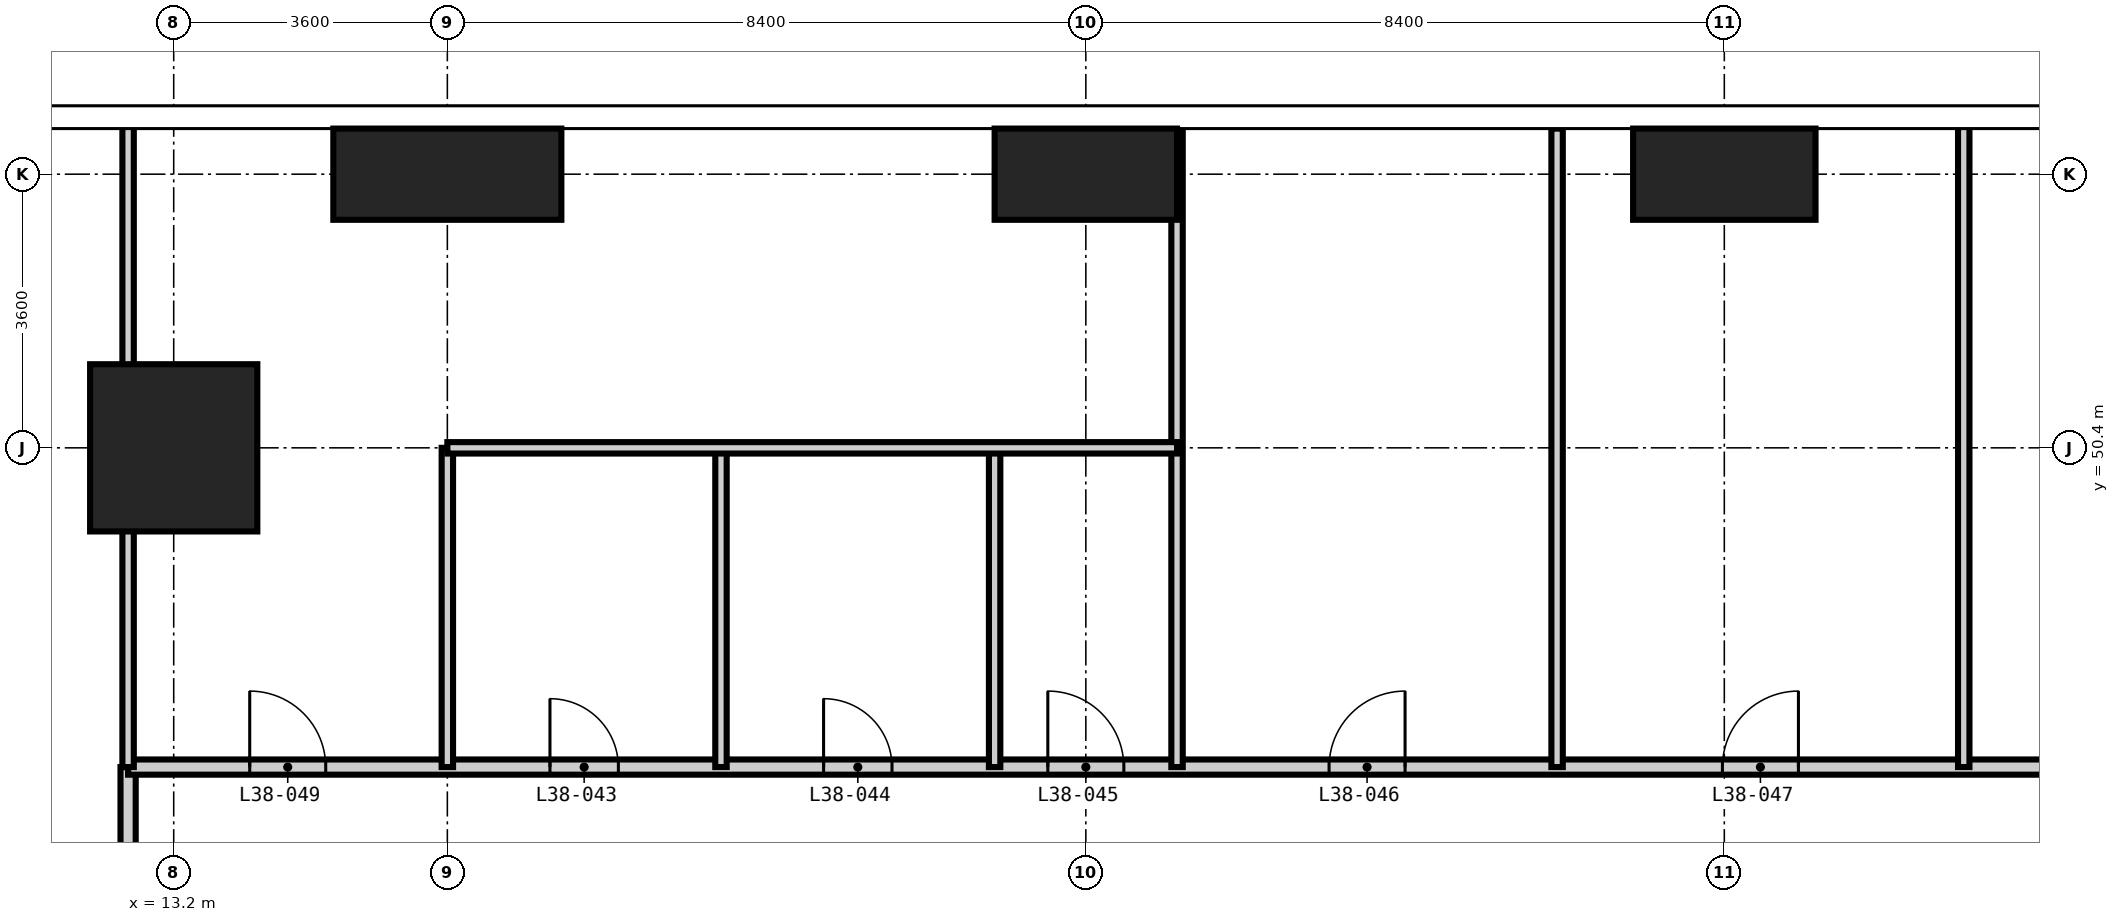
"""IFC4 building model, lengths in metres.
Left out: names, types, materials, properties, quantities, classifications, styles, units other than length and angle.
Written with IfcOpenShell. Run it as: python <this file> out.ifc"""

import sys

from ifc_helpers import new_model, si_unit, direction, frame, frame_2d, origin, origin_2d, place, context, subcontext, project, spatial, rectangle, extrude, element, fill, save


model = new_model("IFC4")
c1 = context("Model", 3, precision=1e-05, world=origin(), true_north=direction((0.0, 1.0)))
c2 = subcontext(c1, "Body", "Model", "MODEL_VIEW")
j1 = project(units=[si_unit("LENGTHUNIT", "METRE"), si_unit("PLANEANGLEUNIT", "RADIAN")], contexts=[c1])
p1 = place(None, origin())
s1 = spatial("IfcSite", under=j1, at=p1, CompositionType="ELEMENT")
p2 = place(p1, origin())
s2 = spatial("IfcBuilding", under=s1, at=p2, CompositionType="ELEMENT")
p3 = place(p2, frame((0.0, 0.0, 147.6)))
s3 = spatial("IfcBuildingStorey", under=s2, at=p3, CompositionType="ELEMENT", Elevation=147.6)
p4 = place(p3, frame((13.2, 50.4, -0.35), z_axis=(0.0, 0.0, 1.0), x_axis=(1.0, 0.0, 0.0)))
e1 = element("IfcColumn", 1, at=p4, inside=s3, PredefinedType="COLUMN", context=c2, shape_type="SweptSolid", body=[
    extrude(rectangle(XDim=2.2, YDim=2.2, at=origin_2d()), origin(), (0.0, 0.0, 1.0), 5.95),
])
p5 = place(p3, frame((16.8, 54.0, -0.35), z_axis=(0.0, 0.0, 1.0), x_axis=(1.0, 0.0, 0.0)))
e2 = element("IfcColumn", 2, at=p5, inside=s3, PredefinedType="COLUMN", context=c2, shape_type="SweptSolid", body=[
    extrude(rectangle(XDim=3.0, YDim=1.2, at=origin_2d()), origin(), (0.0, 0.0, 1.0), 5.95),
])
for number, where, z_axis, x_axis in (
    (3, (25.2, 54.0, -0.35), (0.0, 0.0, 1.0), (1.0, 0.0, 0.0)),
    (4, (33.6, 54.0, -0.35), (0.0, 0.0, 1.0), (1.0, 0.0, 0.0)),
):
    element("IfcColumn", number, at=place(p3, frame(where, z_axis=z_axis, x_axis=x_axis)), inside=s3, PredefinedType="COLUMN", context=c2, shape_type="SweptSolid", body=[
        extrude(rectangle(XDim=2.4, YDim=1.2, at=origin_2d()), origin(), (0.0, 0.0, 1.0), 5.95),
    ])
p6 = place(p3, frame((12.6, 33.6, 0.0), z_axis=(0.0, 0.0, 1.0), x_axis=(0.0, 1.0, 0.0)))
e5 = element("IfcWall", 5, at=p6, inside=s3, PredefinedType="PARTITIONING", context=c2, shape_type="SweptSolid", body=[
    extrude(rectangle(XDim=12.6, YDim=0.2, at=frame_2d((6.3, 0.0))), origin(), (0.0, 0.0, 1.0), 5.6),
])
p7 = place(p3, frame((12.6, 46.2, 0.0), z_axis=(0.0, 0.0, 1.0), x_axis=(1.0, 0.0, 0.0)))
e6 = element("IfcWall", 6, at=p7, inside=s3, PredefinedType="PARTITIONING", context=c2, shape_type="SweptSolid", body=[
    extrude(rectangle(XDim=29.4, YDim=0.2, at=frame_2d((14.7, 0.0))), origin(), (0.0, 0.0, 1.0), 5.6),
])
p8 = place(p7, frame((5.55, 0.0, 0.0)))
e7 = element("IfcOpeningElement", 7, at=p8, cuts=e6, PredefinedType="OPENING", context=c2, shape_type="SweptSolid", body=[
    extrude(rectangle(XDim=0.9, YDim=2.1, at=frame_2d((0.45, 1.05))), frame((0.0, 0.11, 0.0), z_axis=(0.0, -1.0, 0.0), x_axis=(1.0, 0.0, 0.0)), (0.0, 0.0, 1.0), 0.22),
])
p9 = place(p7, frame((9.15, 0.0, 0.0)))
e8 = element("IfcOpeningElement", 8, at=p9, cuts=e6, PredefinedType="OPENING", context=c2, shape_type="SweptSolid", body=[
    extrude(rectangle(XDim=0.9, YDim=2.1, at=frame_2d((0.45, 1.05))), frame((0.0, 0.11, 0.0), z_axis=(0.0, -1.0, 0.0), x_axis=(1.0, 0.0, 0.0)), (0.0, 0.0, 1.0), 0.22),
])
p10 = place(p7, frame((12.1, 0.0, 0.0)))
e9 = element("IfcOpeningElement", 9, at=p10, cuts=e6, PredefinedType="OPENING", context=c2, shape_type="SweptSolid", body=[
    extrude(rectangle(XDim=1.0, YDim=2.1, at=frame_2d((0.5, 1.05))), frame((0.0, 0.11, 0.0), z_axis=(0.0, -1.0, 0.0), x_axis=(1.0, 0.0, 0.0)), (0.0, 0.0, 1.0), 0.22),
])
p11 = place(p7, frame((15.8, 0.0, 0.0)))
e10 = element("IfcOpeningElement", 10, at=p11, cuts=e6, PredefinedType="OPENING", context=c2, shape_type="SweptSolid", body=[
    extrude(rectangle(XDim=1.0, YDim=2.1, at=frame_2d((0.5, 1.05))), frame((0.0, 0.11, 0.0), z_axis=(0.0, -1.0, 0.0), x_axis=(1.0, 0.0, 0.0)), (0.0, 0.0, 1.0), 0.22),
])
p12 = place(p7, frame((20.975, 0.0, 0.0)))
e11 = element("IfcOpeningElement", 11, at=p12, cuts=e6, PredefinedType="OPENING", context=c2, shape_type="SweptSolid", body=[
    extrude(rectangle(XDim=1.0, YDim=2.1, at=frame_2d((0.5, 1.05))), frame((0.0, 0.11, 0.0), z_axis=(0.0, -1.0, 0.0), x_axis=(1.0, 0.0, 0.0)), (0.0, 0.0, 1.0), 0.22),
])
p13 = place(p7, frame((26.275, 0.0, 0.0)))
e12 = element("IfcOpeningElement", 12, at=p13, cuts=e6, PredefinedType="OPENING", context=c2, shape_type="SweptSolid", body=[
    extrude(rectangle(XDim=1.0, YDim=2.1, at=frame_2d((0.5, 1.05))), frame((0.0, 0.11, 0.0), z_axis=(0.0, -1.0, 0.0), x_axis=(1.0, 0.0, 0.0)), (0.0, 0.0, 1.0), 0.22),
])
p14 = place(p7, frame((1.6, 0.0, 0.0)))
e13 = element("IfcOpeningElement", 13, at=p14, cuts=e6, PredefinedType="OPENING", context=c2, shape_type="SweptSolid", body=[
    extrude(rectangle(XDim=1.0, YDim=2.1, at=frame_2d((0.5, 1.05))), frame((0.0, 0.11, 0.0), z_axis=(0.0, -1.0, 0.0), x_axis=(1.0, 0.0, 0.0)), (0.0, 0.0, 1.0), 0.22),
])
p15 = place(p3, frame((12.6, 46.2, 0.0), z_axis=(0.0, 0.0, 1.0), x_axis=(0.0, 1.0, 0.0)))
e14 = element("IfcWall", 14, at=p15, inside=s3, PredefinedType="PARTITIONING", context=c2, shape_type="SweptSolid", body=[
    extrude(rectangle(XDim=8.438, YDim=0.15, at=frame_2d((4.219, 0.0))), origin(), (0.0, 0.0, 1.0), 5.6),
])
for number, where, z_axis, x_axis in (
    (15, (16.8, 46.2, 0.0), (0.0, 0.0, 1.0), (0.0, 1.0, 0.0)),
    (16, (20.4, 46.2, 0.0), (0.0, 0.0, 1.0), (0.0, 1.0, 0.0)),
    (17, (24.0, 46.2, 0.0), (0.0, 0.0, 1.0), (0.0, 1.0, 0.0)),
):
    element("IfcWall", number, at=place(p3, frame(where, z_axis=z_axis, x_axis=x_axis)), inside=s3, PredefinedType="PARTITIONING", context=c2, shape_type="SweptSolid", body=[
        extrude(rectangle(XDim=4.2, YDim=0.15, at=frame_2d((2.1, 0.0))), origin(), (0.0, 0.0, 1.0), 5.6),
    ])
p16 = place(p3, frame((26.4, 46.2, 0.0), z_axis=(0.0, 0.0, 1.0), x_axis=(0.0, 1.0, 0.0)))
e18 = element("IfcWall", 18, at=p16, inside=s3, PredefinedType="PARTITIONING", context=c2, shape_type="SweptSolid", body=[
    extrude(rectangle(XDim=8.438, YDim=0.15, at=frame_2d((4.219, 0.0))), origin(), (0.0, 0.0, 1.0), 5.6),
])
p17 = place(p3, frame((31.4, 46.2, 0.0), z_axis=(0.0, 0.0, 1.0), x_axis=(0.0, 1.0, 0.0)))
e19 = element("IfcWall", 19, at=p17, inside=s3, PredefinedType="PARTITIONING", context=c2, shape_type="SweptSolid", body=[
    extrude(rectangle(XDim=8.4, YDim=0.15, at=frame_2d((4.2, 0.0))), origin(), (0.0, 0.0, 1.0), 5.6),
])
p18 = place(p3, frame((36.75, 46.2, 0.0), z_axis=(0.0, 0.0, 1.0), x_axis=(0.0, 1.0, 0.0)))
e20 = element("IfcWall", 20, at=p18, inside=s3, PredefinedType="PARTITIONING", context=c2, shape_type="SweptSolid", body=[
    extrude(rectangle(XDim=8.438, YDim=0.15, at=frame_2d((4.219, 0.0))), origin(), (0.0, 0.0, 1.0), 5.6),
])
p19 = place(p3, frame((16.8, 50.4, 0.0), z_axis=(0.0, 0.0, 1.0), x_axis=(1.0, 0.0, 0.0)))
e21 = element("IfcWall", 21, at=p19, inside=s3, PredefinedType="PARTITIONING", context=c2, shape_type="SweptSolid", body=[
    extrude(rectangle(XDim=9.6, YDim=0.15, at=frame_2d((4.8, 0.0))), origin(), (0.0, 0.0, 1.0), 5.6),
])
p20 = place(p8, origin())
e22 = element("IfcDoor", 22, at=p20, inside=s3, OperationType="SINGLE_SWING_LEFT", PredefinedType="DOOR", context=c2, shape_type="SweptSolid", body=[
    extrude(rectangle(XDim=0.9, YDim=2.1, at=frame_2d((0.45, 1.05))), frame((0.0, 0.025, 0.0), z_axis=(0.0, -1.0, 0.0), x_axis=(1.0, 0.0, 0.0)), (0.0, 0.0, 1.0), 0.05),
])
fill(e7, e22)
p21 = place(p9, origin())
e23 = element("IfcDoor", 23, at=p21, inside=s3, OperationType="SINGLE_SWING_LEFT", PredefinedType="DOOR", context=c2, shape_type="SweptSolid", body=[
    extrude(rectangle(XDim=0.9, YDim=2.1, at=frame_2d((0.45, 1.05))), frame((0.0, 0.025, 0.0), z_axis=(0.0, -1.0, 0.0), x_axis=(1.0, 0.0, 0.0)), (0.0, 0.0, 1.0), 0.05),
])
fill(e8, e23)
p22 = place(p10, origin())
e24 = element("IfcDoor", 24, at=p22, inside=s3, OperationType="SINGLE_SWING_LEFT", PredefinedType="DOOR", context=c2, shape_type="SweptSolid", body=[
    extrude(rectangle(XDim=1.0, YDim=2.1, at=frame_2d((0.5, 1.05))), frame((0.0, 0.025, 0.0), z_axis=(0.0, -1.0, 0.0), x_axis=(1.0, 0.0, 0.0)), (0.0, 0.0, 1.0), 0.05),
])
fill(e9, e24)
p23 = place(p11, origin())
e25 = element("IfcDoor", 25, at=p23, inside=s3, OperationType="SINGLE_SWING_RIGHT", PredefinedType="DOOR", context=c2, shape_type="SweptSolid", body=[
    extrude(rectangle(XDim=1.0, YDim=2.1, at=frame_2d((0.5, 1.05))), frame((0.0, 0.025, 0.0), z_axis=(0.0, -1.0, 0.0), x_axis=(1.0, 0.0, 0.0)), (0.0, 0.0, 1.0), 0.05),
])
fill(e10, e25)
p24 = place(p12, origin())
e26 = element("IfcDoor", 26, at=p24, inside=s3, OperationType="SINGLE_SWING_RIGHT", PredefinedType="DOOR", context=c2, shape_type="SweptSolid", body=[
    extrude(rectangle(XDim=1.0, YDim=2.1, at=frame_2d((0.5, 1.05))), frame((0.0, 0.025, 0.0), z_axis=(0.0, -1.0, 0.0), x_axis=(1.0, 0.0, 0.0)), (0.0, 0.0, 1.0), 0.05),
])
fill(e11, e26)
p25 = place(p14, origin())
e27 = element("IfcDoor", 27, at=p25, inside=s3, OperationType="SINGLE_SWING_LEFT", PredefinedType="DOOR", context=c2, shape_type="SweptSolid", body=[
    extrude(rectangle(XDim=1.0, YDim=2.1, at=frame_2d((0.5, 1.05))), frame((0.0, 0.025, 0.0), z_axis=(0.0, -1.0, 0.0), x_axis=(1.0, 0.0, 0.0)), (0.0, 0.0, 1.0), 0.05),
])
fill(e13, e27)
save(model, sys.argv[1])
